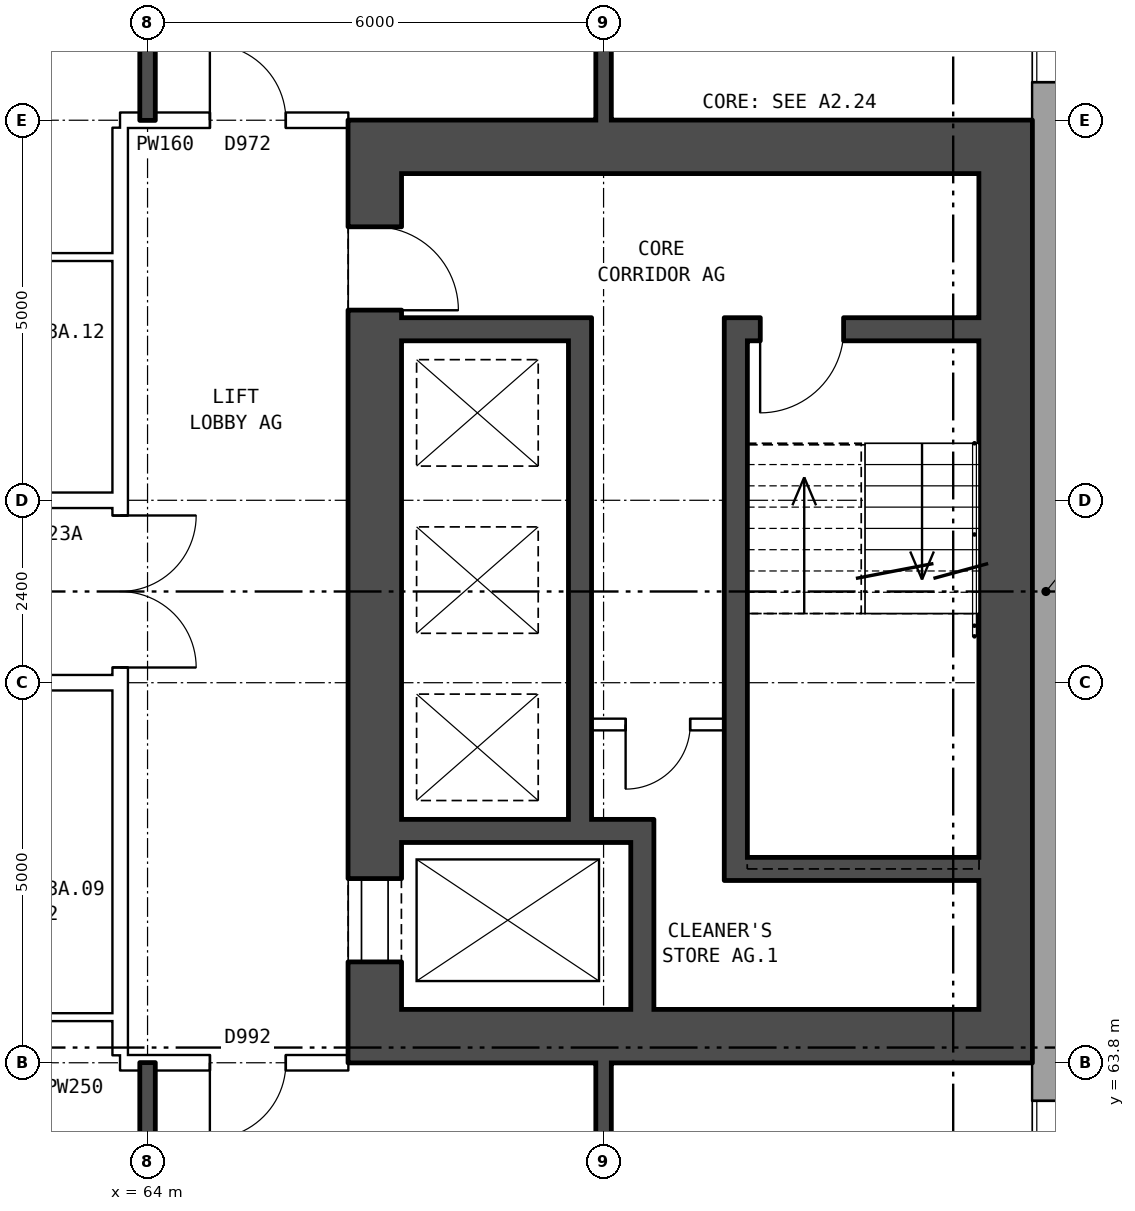
"""IFC4 building model, lengths in metres.
Left out: names, types, materials, properties, quantities, classifications, styles, units other than length and angle.
Written with IfcOpenShell. Run it as: python <this file> out.ifc"""

import sys

from ifc_helpers import new_model, si_unit, direction, frame, frame_2d, origin, place, context, subcontext, project, spatial, rectangle, extrude, element, fill, save


model = new_model("IFC4")
c1 = context("Model", 3, precision=1e-05, world=origin(), true_north=direction((0.0, 1.0)))
c2 = subcontext(c1, "Body", "Model", "MODEL_VIEW")
j1 = project(units=[si_unit("LENGTHUNIT", "METRE"), si_unit("PLANEANGLEUNIT", "RADIAN")], contexts=[c1])
p1 = place(None, origin())
s1 = spatial("IfcSite", under=j1, at=p1, CompositionType="ELEMENT")
p2 = place(p1, origin())
s2 = spatial("IfcBuilding", under=s1, at=p2, CompositionType="ELEMENT")
p3 = place(p2, frame((0.0, 0.0, 84.0)))
s3 = spatial("IfcBuildingStorey", under=s2, at=p3, CompositionType="ELEMENT", Elevation=84.0)
p4 = place(p3, frame((75.82, 57.075, 0.0), z_axis=(0.0, 0.0, 1.0), x_axis=(0.0, 1.0, 0.0)))
e1 = element("IfcWall", 1, at=p4, inside=s3, PredefinedType="STANDARD", context=c2, shape_type="SweptSolid", body=[
    extrude(rectangle(XDim=25.851, YDim=0.36, at=frame_2d((12.925, 0.0))), origin(), (0.0, 0.0, 1.0), 2.85),
])
p5 = place(p4, frame((0.3, 0.0, 0.8)))
e2 = element("IfcOpeningElement", 2, at=p5, cuts=e1, PredefinedType="OPENING", context=c2, shape_type="SweptSolid", body=[
    extrude(rectangle(XDim=1.0, YDim=1.8, at=frame_2d((0.5, 0.9))), frame((0.0, 0.19, 0.0), z_axis=(0.0, -1.0, 0.0), x_axis=(1.0, 0.0, 0.0)), (0.0, 0.0, 1.0), 0.38),
])
p6 = place(p4, frame((4.625, 0.0, 0.8)))
e3 = element("IfcOpeningElement", 3, at=p6, cuts=e1, PredefinedType="OPENING", context=c2, shape_type="SweptSolid", body=[
    extrude(rectangle(XDim=1.6, YDim=1.8, at=frame_2d((0.8, 0.9))), frame((0.0, 0.19, 0.0), z_axis=(0.0, -1.0, 0.0), x_axis=(1.0, 0.0, 0.0)), (0.0, 0.0, 1.0), 0.38),
])
p7 = place(p4, frame((19.625, 0.0, 0.8)))
e4 = element("IfcOpeningElement", 4, at=p7, cuts=e1, PredefinedType="OPENING", context=c2, shape_type="SweptSolid", body=[
    extrude(rectangle(XDim=1.6, YDim=1.8, at=frame_2d((0.8, 0.9))), frame((0.0, 0.19, 0.0), z_axis=(0.0, -1.0, 0.0), x_axis=(1.0, 0.0, 0.0)), (0.0, 0.0, 1.0), 0.38),
])
p8 = place(p4, frame((23.125, 0.0, 0.8)))
e5 = element("IfcOpeningElement", 5, at=p8, cuts=e1, PredefinedType="OPENING", context=c2, shape_type="SweptSolid", body=[
    extrude(rectangle(XDim=1.0, YDim=0.9, at=frame_2d((0.5, 0.45))), frame((0.0, 0.19, 0.0), z_axis=(0.0, -1.0, 0.0), x_axis=(1.0, 0.0, 0.0)), (0.0, 0.0, 1.0), 0.38),
])
p9 = place(p4, frame((1.6, 0.0, 0.8)))
e6 = element("IfcOpeningElement", 6, at=p9, cuts=e1, PredefinedType="OPENING", context=c2, shape_type="SweptSolid", body=[
    extrude(rectangle(XDim=1.0, YDim=0.9, at=frame_2d((0.5, 0.45))), frame((0.0, 0.19, 0.0), z_axis=(0.0, -1.0, 0.0), x_axis=(1.0, 0.0, 0.0)), (0.0, 0.0, 1.0), 0.38),
])
p10 = place(p4, frame((24.425, 0.0, 0.8)))
e7 = element("IfcOpeningElement", 7, at=p10, cuts=e1, PredefinedType="OPENING", context=c2, shape_type="SweptSolid", body=[
    extrude(rectangle(XDim=1.0, YDim=1.8, at=frame_2d((0.5, 0.9))), frame((0.0, 0.19, 0.0), z_axis=(0.0, -1.0, 0.0), x_axis=(1.0, 0.0, 0.0)), (0.0, 0.0, 1.0), 0.38),
])
p11 = place(p3, frame((66.99, 64.5, 0.0), z_axis=(0.0, 0.0, 1.0), x_axis=(0.0, 1.0, 0.0)))
e8 = element("IfcWall", 8, at=p11, inside=s3, PredefinedType="SHEAR", context=c2, shape_type="SweptSolid", body=[
    extrude(rectangle(XDim=11.0, YDim=0.7, at=frame_2d((5.5, 0.0))), origin(), (0.0, 0.0, 1.0), 2.85),
])
p12 = place(p11, frame((0.625, 0.0, 0.0)))
e9 = element("IfcOpeningElement", 9, at=p12, cuts=e8, PredefinedType="OPENING", context=c2, shape_type="SweptSolid", body=[
    extrude(rectangle(XDim=1.1, YDim=2.1, at=frame_2d((0.55, 1.05))), frame((0.0, 0.36, 0.0), z_axis=(0.0, -1.0, 0.0), x_axis=(1.0, 0.0, 0.0)), (0.0, 0.0, 1.0), 0.72),
])
p13 = place(p11, frame((9.2, 0.0, 0.0)))
e10 = element("IfcOpeningElement", 10, at=p13, cuts=e8, PredefinedType="OPENING", context=c2, shape_type="SweptSolid", body=[
    extrude(rectangle(XDim=1.1, YDim=2.1, at=frame_2d((0.55, 1.05))), frame((0.0, 0.36, 0.0), z_axis=(0.0, -1.0, 0.0), x_axis=(1.0, 0.0, 0.0)), (0.0, 0.0, 1.0), 0.72),
])
p14 = place(p3, frame((75.29, 64.5, 0.0), z_axis=(0.0, 0.0, 1.0), x_axis=(0.0, 1.0, 0.0)))
e11 = element("IfcWall", 11, at=p14, inside=s3, PredefinedType="SHEAR", context=c2, shape_type="SweptSolid", body=[
    extrude(rectangle(XDim=11.0, YDim=0.7, at=frame_2d((5.5, 0.0))), origin(), (0.0, 0.0, 1.0), 2.85),
])
for number, where, z_axis, x_axis in (
    (12, (66.64, 64.15, 0.0), (0.0, 0.0, 1.0), (1.0, 0.0, 0.0)),
    (13, (66.64, 75.85, 0.0), (0.0, 0.0, 1.0), (1.0, 0.0, 0.0)),
):
    element("IfcWall", number, at=place(p3, frame(where, z_axis=z_axis, x_axis=x_axis)), inside=s3, PredefinedType="SHEAR", context=c2, shape_type="SweptSolid", body=[
        extrude(rectangle(XDim=9.0, YDim=0.7, at=frame_2d((4.5, 0.0))), origin(), (0.0, 0.0, 1.0), 2.85),
    ])
p15 = place(p3, frame((71.89, 66.35, 0.0), z_axis=(0.0, 0.0, 1.0), x_axis=(1.0, 0.0, 0.0)))
e14 = element("IfcWall", 14, at=p15, inside=s3, PredefinedType="SHEAR", context=c2, shape_type="SweptSolid", body=[
    extrude(rectangle(XDim=3.05, YDim=0.3, at=frame_2d((1.525, 0.0))), origin(), (0.0, 0.0, 1.0), 2.85),
])
p16 = place(p3, frame((67.34, 66.85, 0.0), z_axis=(0.0, 0.0, 1.0), x_axis=(1.0, 0.0, 0.0)))
e15 = element("IfcWall", 15, at=p16, inside=s3, PredefinedType="SHEAR", context=c2, shape_type="SweptSolid", body=[
    extrude(rectangle(XDim=3.32, YDim=0.3, at=frame_2d((1.66, 0.0))), origin(), (0.0, 0.0, 1.0), 2.85),
])
p17 = place(p3, frame((69.84, 68.25, 0.0), z_axis=(0.0, 0.0, 1.0), x_axis=(1.0, 0.0, 0.0)))
e16 = element("IfcWall", 16, at=p17, inside=s3, PredefinedType="PARTITIONING", context=c2, shape_type="SweptSolid", body=[
    extrude(rectangle(XDim=1.75, YDim=0.15, at=frame_2d((0.875, 0.0))), origin(), (0.0, 0.0, 1.0), 2.85),
])
p18 = place(p17, frame((0.45, 0.0, 0.0)))
e17 = element("IfcOpeningElement", 17, at=p18, cuts=e16, PredefinedType="OPENING", context=c2, shape_type="SweptSolid", body=[
    extrude(rectangle(XDim=0.85, YDim=2.1, at=frame_2d((0.425, 1.05))), frame((0.0, 0.085, 0.0), z_axis=(0.0, -1.0, 0.0), x_axis=(1.0, 0.0, 0.0)), (0.0, 0.0, 1.0), 0.17),
])
p19 = place(p3, frame((67.34, 73.45, 0.0), z_axis=(0.0, 0.0, 1.0), x_axis=(1.0, 0.0, 0.0)))
e18 = element("IfcWall", 18, at=p19, inside=s3, PredefinedType="SHEAR", context=c2, shape_type="SweptSolid", body=[
    extrude(rectangle(XDim=2.2, YDim=0.3, at=frame_2d((1.1, 0.0))), origin(), (0.0, 0.0, 1.0), 2.85),
])
p20 = place(p3, frame((71.89, 73.45, 0.0), z_axis=(0.0, 0.0, 1.0), x_axis=(1.0, 0.0, 0.0)))
e19 = element("IfcWall", 19, at=p20, inside=s3, PredefinedType="SHEAR", context=c2, shape_type="SweptSolid", body=[
    extrude(rectangle(XDim=3.05, YDim=0.3, at=frame_2d((1.525, 0.0))), origin(), (0.0, 0.0, 1.0), 2.85),
])
p21 = place(p20, frame((0.17, 0.0, 0.0)))
e20 = element("IfcOpeningElement", 20, at=p21, cuts=e19, PredefinedType="OPENING", context=c2, shape_type="SweptSolid", body=[
    extrude(rectangle(XDim=1.1, YDim=2.1, at=frame_2d((0.55, 1.05))), frame((0.0, 0.16, 0.0), z_axis=(0.0, -1.0, 0.0), x_axis=(1.0, 0.0, 0.0)), (0.0, 0.0, 1.0), 0.32),
])
p22 = place(p3, frame((69.69, 67.0, 0.0), z_axis=(0.0, 0.0, 1.0), x_axis=(0.0, 1.0, 0.0)))
e21 = element("IfcWall", 21, at=p22, inside=s3, PredefinedType="SHEAR", context=c2, shape_type="SweptSolid", body=[
    extrude(rectangle(XDim=6.6, YDim=0.3, at=frame_2d((3.3, 0.0))), origin(), (0.0, 0.0, 1.0), 2.85),
])
p23 = place(p3, frame((70.51, 64.5, 0.0), z_axis=(0.0, 0.0, 1.0), x_axis=(0.0, 1.0, 0.0)))
e22 = element("IfcWall", 22, at=p23, inside=s3, PredefinedType="SHEAR", context=c2, shape_type="SweptSolid", body=[
    extrude(rectangle(XDim=2.2, YDim=0.3, at=frame_2d((1.1, 0.0))), origin(), (0.0, 0.0, 1.0), 2.85),
])
p24 = place(p3, frame((71.74, 66.2, 0.0), z_axis=(0.0, 0.0, 1.0), x_axis=(0.0, 1.0, 0.0)))
e23 = element("IfcWall", 23, at=p24, inside=s3, PredefinedType="SHEAR", context=c2, shape_type="SweptSolid", body=[
    extrude(rectangle(XDim=7.4, YDim=0.3, at=frame_2d((3.7, 0.0))), origin(), (0.0, 0.0, 1.0), 2.85),
])
p25 = place(p3, frame((63.64, 63.9, 0.0), z_axis=(0.0, 0.0, 1.0), x_axis=(0.0, 1.0, 0.0)))
e24 = element("IfcWall", 24, at=p25, inside=s3, PredefinedType="PARTITIONING", context=c2, shape_type="SweptSolid", body=[
    extrude(rectangle(XDim=12.2, YDim=0.2, at=frame_2d((6.1, 0.0))), origin(), (0.0, 0.0, 1.0), 2.85),
])
p26 = place(p25, frame((5.1, 0.0, 0.0)))
e25 = element("IfcOpeningElement", 25, at=p26, cuts=e24, PredefinedType="OPENING", context=c2, shape_type="SweptSolid", body=[
    extrude(rectangle(XDim=2.0, YDim=2.1, at=frame_2d((1.0, 1.05))), frame((0.0, 0.11, 0.0), z_axis=(0.0, -1.0, 0.0), x_axis=(1.0, 0.0, 0.0)), (0.0, 0.0, 1.0), 0.22),
])
p27 = place(p3, frame((63.64, 63.8, 0.0), z_axis=(0.0, 0.0, 1.0), x_axis=(1.0, 0.0, 0.0)))
e26 = element("IfcWall", 26, at=p27, inside=s3, PredefinedType="PARTITIONING", context=c2, shape_type="SweptSolid", body=[
    extrude(rectangle(XDim=3.0, YDim=0.2, at=frame_2d((1.5, 0.0))), origin(), (0.0, 0.0, 1.0), 2.85),
])
p28 = place(p27, frame((1.18, 0.0, 0.0)))
e27 = element("IfcOpeningElement", 27, at=p28, cuts=e26, PredefinedType="OPENING", context=c2, shape_type="SweptSolid", body=[
    extrude(rectangle(XDim=1.0, YDim=2.1, at=frame_2d((0.5, 1.05))), frame((0.0, 0.11, 0.0), z_axis=(0.0, -1.0, 0.0), x_axis=(1.0, 0.0, 0.0)), (0.0, 0.0, 1.0), 0.22),
])
p29 = place(p3, frame((61.0, 64.4, 0.0), z_axis=(0.0, 0.0, 1.0), x_axis=(1.0, 0.0, 0.0)))
e28 = element("IfcWall", 28, at=p29, inside=s3, PredefinedType="PARTITIONING", context=c2, shape_type="SweptSolid", body=[
    extrude(rectangle(XDim=2.64, YDim=0.1, at=frame_2d((1.32, 0.0))), origin(), (0.0, 0.0, 1.0), 2.85),
])
p30 = place(p3, frame((44.36, 68.8, 0.0), z_axis=(0.0, 0.0, 1.0), x_axis=(1.0, 0.0, 0.0)))
e29 = element("IfcWall", 29, at=p30, inside=s3, PredefinedType="PARTITIONING", context=c2, shape_type="SweptSolid", body=[
    extrude(rectangle(XDim=19.28, YDim=0.2, at=frame_2d((9.64, 0.0))), origin(), (0.0, 0.0, 1.0), 2.85),
])
p31 = place(p30, frame((14.64, 0.0, 0.0)))
e30 = element("IfcOpeningElement", 30, at=p31, cuts=e29, PredefinedType="OPENING", context=c2, shape_type="SweptSolid", body=[
    extrude(rectangle(XDim=1.0, YDim=2.1, at=frame_2d((0.5, 1.05))), frame((0.0, 0.11, 0.0), z_axis=(0.0, -1.0, 0.0), x_axis=(1.0, 0.0, 0.0)), (0.0, 0.0, 1.0), 0.22),
])
p32 = place(p30, frame((11.64, 0.0, 0.0)))
e31 = element("IfcOpeningElement", 31, at=p32, cuts=e29, PredefinedType="OPENING", context=c2, shape_type="SweptSolid", body=[
    extrude(rectangle(XDim=1.0, YDim=2.1, at=frame_2d((0.5, 1.05))), frame((0.0, 0.11, 0.0), z_axis=(0.0, -1.0, 0.0), x_axis=(1.0, 0.0, 0.0)), (0.0, 0.0, 1.0), 0.22),
])
p33 = place(p30, frame((2.64, 0.0, 0.0)))
e32 = element("IfcOpeningElement", 32, at=p33, cuts=e29, PredefinedType="OPENING", context=c2, shape_type="SweptSolid", body=[
    extrude(rectangle(XDim=1.0, YDim=2.1, at=frame_2d((0.5, 1.05))), frame((0.0, 0.11, 0.0), z_axis=(0.0, -1.0, 0.0), x_axis=(1.0, 0.0, 0.0)), (0.0, 0.0, 1.0), 0.22),
])
p34 = place(p3, frame((44.36, 71.2, 0.0), z_axis=(0.0, 0.0, 1.0), x_axis=(1.0, 0.0, 0.0)))
e33 = element("IfcWall", 33, at=p34, inside=s3, PredefinedType="PARTITIONING", context=c2, shape_type="SweptSolid", body=[
    extrude(rectangle(XDim=19.28, YDim=0.2, at=frame_2d((9.64, 0.0))), origin(), (0.0, 0.0, 1.0), 2.85),
])
p35 = place(p34, frame((14.64, 0.0, 0.0)))
e34 = element("IfcOpeningElement", 34, at=p35, cuts=e33, PredefinedType="OPENING", context=c2, shape_type="SweptSolid", body=[
    extrude(rectangle(XDim=1.0, YDim=2.1, at=frame_2d((0.5, 1.05))), frame((0.0, 0.11, 0.0), z_axis=(0.0, -1.0, 0.0), x_axis=(1.0, 0.0, 0.0)), (0.0, 0.0, 1.0), 0.22),
])
p36 = place(p34, frame((8.64, 0.0, 0.0)))
e35 = element("IfcOpeningElement", 35, at=p36, cuts=e33, PredefinedType="OPENING", context=c2, shape_type="SweptSolid", body=[
    extrude(rectangle(XDim=1.0, YDim=2.1, at=frame_2d((0.5, 1.05))), frame((0.0, 0.11, 0.0), z_axis=(0.0, -1.0, 0.0), x_axis=(1.0, 0.0, 0.0)), (0.0, 0.0, 1.0), 0.22),
])
p37 = place(p34, frame((2.64, 0.0, 0.0)))
e36 = element("IfcOpeningElement", 36, at=p37, cuts=e33, PredefinedType="OPENING", context=c2, shape_type="SweptSolid", body=[
    extrude(rectangle(XDim=1.0, YDim=2.1, at=frame_2d((0.5, 1.05))), frame((0.0, 0.11, 0.0), z_axis=(0.0, -1.0, 0.0), x_axis=(1.0, 0.0, 0.0)), (0.0, 0.0, 1.0), 0.22),
])
p38 = place(p3, frame((61.0, 74.4, 0.0), z_axis=(0.0, 0.0, 1.0), x_axis=(1.0, 0.0, 0.0)))
e37 = element("IfcWall", 37, at=p38, inside=s3, PredefinedType="PARTITIONING", context=c2, shape_type="SweptSolid", body=[
    extrude(rectangle(XDim=2.64, YDim=0.1, at=frame_2d((1.32, 0.0))), origin(), (0.0, 0.0, 1.0), 2.85),
])
p39 = place(p3, frame((63.64, 76.2, 0.0), z_axis=(0.0, 0.0, 1.0), x_axis=(1.0, 0.0, 0.0)))
e38 = element("IfcWall", 38, at=p39, inside=s3, PredefinedType="PARTITIONING", context=c2, shape_type="SweptSolid", body=[
    extrude(rectangle(XDim=3.0, YDim=0.2, at=frame_2d((1.5, 0.0))), origin(), (0.0, 0.0, 1.0), 2.85),
])
p40 = place(p39, frame((1.18, 0.0, 0.0)))
e39 = element("IfcOpeningElement", 39, at=p40, cuts=e38, PredefinedType="OPENING", context=c2, shape_type="SweptSolid", body=[
    extrude(rectangle(XDim=1.0, YDim=2.1, at=frame_2d((0.5, 1.05))), frame((0.0, 0.11, 0.0), z_axis=(0.0, -1.0, 0.0), x_axis=(1.0, 0.0, 0.0)), (0.0, 0.0, 1.0), 0.22),
])
for number, where, z_axis, x_axis in (
    (40, (64.0, 54.36, 0.0), (0.0, 0.0, 1.0), (0.0, 1.0, 0.0)),
    (41, (64.0, 76.2, 0.0), (0.0, 0.0, 1.0), (0.0, 1.0, 0.0)),
):
    element("IfcWall", number, at=place(p3, frame(where, z_axis=z_axis, x_axis=x_axis)), inside=s3, PredefinedType="SOLIDWALL", context=c2, shape_type="SweptSolid", body=[
        extrude(rectangle(XDim=9.44, YDim=0.2, at=frame_2d((4.72, 0.0))), origin(), (0.0, 0.0, 1.0), 2.85),
    ])
p41 = place(p3, frame((70.0, 54.36, 0.0), z_axis=(0.0, 0.0, 1.0), x_axis=(0.0, 1.0, 0.0)))
e42 = element("IfcWall", 42, at=p41, inside=s3, PredefinedType="SOLIDWALL", context=c2, shape_type="SweptSolid", body=[
    extrude(rectangle(XDim=9.44, YDim=0.2, at=frame_2d((4.72, 0.0))), origin(), (0.0, 0.0, 1.0), 2.85),
])
p42 = place(p41, frame((2.32, 0.0, 0.0)))
e43 = element("IfcOpeningElement", 43, at=p42, cuts=e42, PredefinedType="OPENING", context=c2, shape_type="SweptSolid", body=[
    extrude(rectangle(XDim=0.9, YDim=2.1, at=frame_2d((0.45, 1.05))), frame((0.0, 0.11, 0.0), z_axis=(0.0, -1.0, 0.0), x_axis=(1.0, 0.0, 0.0)), (0.0, 0.0, 1.0), 0.22),
])
p43 = place(p41, frame((7.59, 0.0, 0.0)))
e44 = element("IfcOpeningElement", 44, at=p43, cuts=e42, PredefinedType="OPENING", context=c2, shape_type="SweptSolid", body=[
    extrude(rectangle(XDim=0.9, YDim=2.1, at=frame_2d((0.45, 1.05))), frame((0.0, 0.11, 0.0), z_axis=(0.0, -1.0, 0.0), x_axis=(1.0, 0.0, 0.0)), (0.0, 0.0, 1.0), 0.22),
])
p44 = place(p3, frame((70.0, 76.2, 0.0), z_axis=(0.0, 0.0, 1.0), x_axis=(0.0, 1.0, 0.0)))
e45 = element("IfcWall", 45, at=p44, inside=s3, PredefinedType="SOLIDWALL", context=c2, shape_type="SweptSolid", body=[
    extrude(rectangle(XDim=9.44, YDim=0.2, at=frame_2d((4.72, 0.0))), origin(), (0.0, 0.0, 1.0), 2.85),
])
p45 = place(p44, frame((6.07, 0.0, 0.0)))
e46 = element("IfcOpeningElement", 46, at=p45, cuts=e45, PredefinedType="OPENING", context=c2, shape_type="SweptSolid", body=[
    extrude(rectangle(XDim=0.9, YDim=2.1, at=frame_2d((0.45, 1.05))), frame((0.0, 0.11, 0.0), z_axis=(0.0, -1.0, 0.0), x_axis=(1.0, 0.0, 0.0)), (0.0, 0.0, 1.0), 0.22),
])
p46 = place(p44, frame((0.95, 0.0, 0.0)))
e47 = element("IfcOpeningElement", 47, at=p46, cuts=e45, PredefinedType="OPENING", context=c2, shape_type="SweptSolid", body=[
    extrude(rectangle(XDim=0.9, YDim=2.1, at=frame_2d((0.45, 1.05))), frame((0.0, 0.11, 0.0), z_axis=(0.0, -1.0, 0.0), x_axis=(1.0, 0.0, 0.0)), (0.0, 0.0, 1.0), 0.22),
])
p47 = place(p6, origin())
e48 = element("IfcWindow", 48, at=p47, inside=s3, PartitioningType="SINGLE_PANEL", PredefinedType="WINDOW", context=c2, shape_type="SweptSolid", body=[
    extrude(rectangle(XDim=1.6, YDim=1.8, at=frame_2d((0.8, 0.9))), frame((0.0, 0.15, 0.0), z_axis=(0.0, -1.0, 0.0), x_axis=(1.0, 0.0, 0.0)), (0.0, 0.0, 1.0), 0.06),
])
fill(e3, e48)
p48 = place(p7, origin())
e49 = element("IfcWindow", 49, at=p48, inside=s3, PartitioningType="SINGLE_PANEL", PredefinedType="WINDOW", context=c2, shape_type="SweptSolid", body=[
    extrude(rectangle(XDim=1.6, YDim=1.8, at=frame_2d((0.8, 0.9))), frame((0.0, 0.15, 0.0), z_axis=(0.0, -1.0, 0.0), x_axis=(1.0, 0.0, 0.0)), (0.0, 0.0, 1.0), 0.06),
])
fill(e4, e49)
p49 = place(p12, origin())
e50 = element("IfcDoor", 50, at=p49, inside=s3, OperationType="DOUBLE_DOOR_SLIDING", PredefinedType="DOOR", context=c2, shape_type="SweptSolid", body=[
    extrude(rectangle(XDim=1.1, YDim=2.1, at=frame_2d((0.55, 1.05))), frame((0.0, -0.285, 0.0), z_axis=(0.0, -1.0, 0.0), x_axis=(1.0, 0.0, 0.0)), (0.0, 0.0, 1.0), 0.05),
])
fill(e9, e50)
p50 = place(p13, frame((1.1, 0.0, 0.0), z_axis=(0.0, 0.0, 1.0), x_axis=(-1.0, 0.0, 0.0)))
e51 = element("IfcDoor", 51, at=p50, inside=s3, OperationType="SINGLE_SWING_RIGHT", PredefinedType="DOOR", context=c2, shape_type="SweptSolid", body=[
    extrude(rectangle(XDim=1.1, YDim=2.1, at=frame_2d((0.55, 1.05))), frame((0.0, 0.335, 0.0), z_axis=(0.0, -1.0, 0.0), x_axis=(1.0, 0.0, 0.0)), (0.0, 0.0, 1.0), 0.05),
])
fill(e10, e51)
p51 = place(p21, frame((1.1, 0.0, 0.0), z_axis=(0.0, 0.0, 1.0), x_axis=(-1.0, 0.0, 0.0)))
e52 = element("IfcDoor", 52, at=p51, inside=s3, OperationType="SINGLE_SWING_RIGHT", PredefinedType="DOOR", context=c2, shape_type="SweptSolid", body=[
    extrude(rectangle(XDim=1.1, YDim=2.1, at=frame_2d((0.55, 1.05))), frame((0.0, 0.025, 0.0), z_axis=(0.0, -1.0, 0.0), x_axis=(1.0, 0.0, 0.0)), (0.0, 0.0, 1.0), 0.05),
])
fill(e20, e52)
p52 = place(p18, frame((0.85, 0.0, 0.0), z_axis=(0.0, 0.0, 1.0), x_axis=(-1.0, 0.0, 0.0)))
e53 = element("IfcDoor", 53, at=p52, inside=s3, OperationType="SINGLE_SWING_RIGHT", PredefinedType="DOOR", context=c2, shape_type="SweptSolid", body=[
    extrude(rectangle(XDim=0.85, YDim=2.1, at=frame_2d((0.425, 1.05))), frame((0.0, 0.025, 0.0), z_axis=(0.0, -1.0, 0.0), x_axis=(1.0, 0.0, 0.0)), (0.0, 0.0, 1.0), 0.05),
])
fill(e17, e53)
p53 = place(p26, frame((2.0, 0.0, 0.0), z_axis=(0.0, 0.0, 1.0), x_axis=(-1.0, 0.0, 0.0)))
e54 = element("IfcDoor", 54, at=p53, inside=s3, OperationType="DOUBLE_DOOR_SINGLE_SWING", PredefinedType="DOOR", context=c2, shape_type="SweptSolid", body=[
    extrude(rectangle(XDim=2.0, YDim=2.1, at=frame_2d((1.0, 1.05))), frame((0.0, 0.025, 0.0), z_axis=(0.0, -1.0, 0.0), x_axis=(1.0, 0.0, 0.0)), (0.0, 0.0, 1.0), 0.05),
])
fill(e25, e54)
p54 = place(p28, frame((1.0, 0.0, 0.0), z_axis=(0.0, 0.0, 1.0), x_axis=(-1.0, 0.0, 0.0)))
e55 = element("IfcDoor", 55, at=p54, inside=s3, OperationType="SINGLE_SWING_RIGHT", PredefinedType="DOOR", context=c2, shape_type="SweptSolid", body=[
    extrude(rectangle(XDim=1.0, YDim=2.1, at=frame_2d((0.5, 1.05))), frame((0.0, 0.025, 0.0), z_axis=(0.0, -1.0, 0.0), x_axis=(1.0, 0.0, 0.0)), (0.0, 0.0, 1.0), 0.05),
])
fill(e27, e55)
p55 = place(p40, origin())
e56 = element("IfcDoor", 56, at=p55, inside=s3, OperationType="SINGLE_SWING_LEFT", PredefinedType="DOOR", context=c2, shape_type="SweptSolid", body=[
    extrude(rectangle(XDim=1.0, YDim=2.1, at=frame_2d((0.5, 1.05))), frame((0.0, 0.025, 0.0), z_axis=(0.0, -1.0, 0.0), x_axis=(1.0, 0.0, 0.0)), (0.0, 0.0, 1.0), 0.05),
])
fill(e39, e56)
save(model, sys.argv[1])
